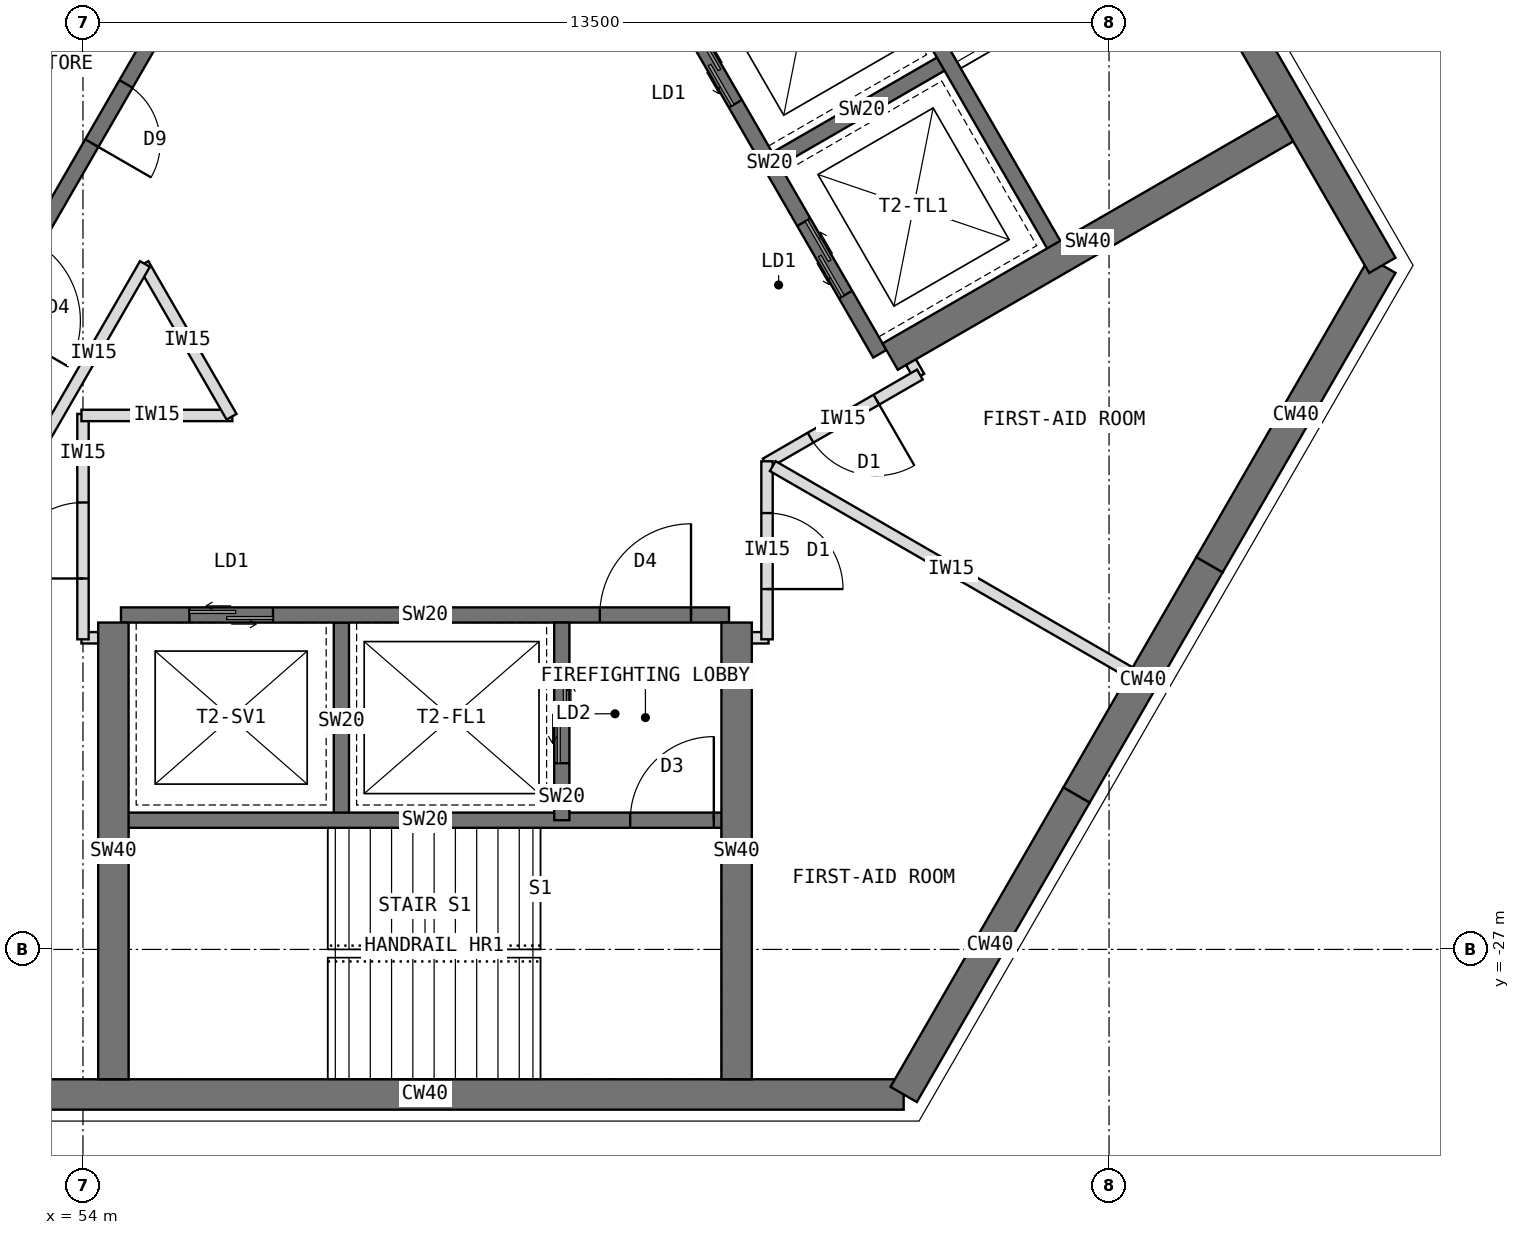
"""IFC4 building model, lengths in metres.
Left out: names, types, materials, properties, quantities, classifications, styles, units other than length and angle.
Written with IfcOpenShell. Run it as: python <this file> out.ifc"""

import sys

from ifc_helpers import new_model, si_unit, direction, frame, frame_2d, origin, place, context, subcontext, project, spatial, rectangle, extrude, element, fill, save


model = new_model("IFC4")
c1 = context("Model", 3, precision=1e-05, world=origin(), true_north=direction((0.0, 1.0)))
c2 = subcontext(c1, "Body", "Model", "MODEL_VIEW")
j1 = project(units=[si_unit("LENGTHUNIT", "METRE"), si_unit("PLANEANGLEUNIT", "RADIAN")], contexts=[c1])
p1 = place(None, origin())
s1 = spatial("IfcSite", under=j1, at=p1, CompositionType="ELEMENT")
p2 = place(p1, origin())
s2 = spatial("IfcBuilding", under=s1, at=p2, CompositionType="ELEMENT")
p3 = place(p2, frame((0.0, 0.0, 279.5)))
s3 = spatial("IfcBuildingStorey", under=s2, at=p3, CompositionType="ELEMENT", Elevation=279.5)
p4 = place(p3, frame((52.202, -28.908, 0.0), z_axis=(0.0, 0.0, 1.0), x_axis=(1.0, 0.0, 0.0)))
e1 = element("IfcWall", 1, at=p4, inside=s3, PredefinedType="SHEAR", context=c2, shape_type="SweptSolid", body=[
    extrude(rectangle(XDim=12.596, YDim=0.4, at=frame_2d((6.298, 0.0))), origin(), (0.0, 0.0, 1.0), 4.0),
])
p5 = place(p3, frame((64.798, -28.908, 0.0), z_axis=(0.0, 0.0, 1.0), x_axis=(0.499984222037, 0.866034513004, 0.0)))
e2 = element("IfcWall", 2, at=p5, inside=s3, PredefinedType="SHEAR", context=c2, shape_type="SweptSolid", body=[
    extrude(rectangle(XDim=4.548, YDim=0.4, at=frame_2d((2.274, 0.0))), origin(), (0.0, 0.0, 1.0), 4.0),
])
p6 = place(p3, frame((67.072, -24.97, 0.0), z_axis=(0.0, 0.0, 1.0), x_axis=(0.500010275428, 0.866019471182, 0.0)))
e3 = element("IfcWall", 3, at=p6, inside=s3, PredefinedType="SHEAR", context=c2, shape_type="SweptSolid", body=[
    extrude(rectangle(XDim=3.5, YDim=0.4, at=frame_2d((1.75, 0.0))), origin(), (0.0, 0.0, 1.0), 4.0),
])
p7 = place(p3, frame((68.822, -21.939, 0.0), z_axis=(0.0, 0.0, 1.0), x_axis=(0.500024481964, 0.866011268655, 0.0)))
e4 = element("IfcWall", 4, at=p7, inside=s3, PredefinedType="SHEAR", context=c2, shape_type="SweptSolid", body=[
    extrude(rectangle(XDim=4.548, YDim=0.4, at=frame_2d((2.274, 0.0))), origin(), (0.0, 0.0, 1.0), 4.0),
])
p8 = place(p3, frame((71.096, -18.0, 0.0), z_axis=(0.0, 0.0, 1.0), x_axis=(-0.500005998175, 0.866021940709, 0.0)))
e5 = element("IfcWall", 5, at=p8, inside=s3, PredefinedType="SHEAR", context=c2, shape_type="SweptSolid", body=[
    extrude(rectangle(XDim=12.596, YDim=0.4, at=frame_2d((6.298, 0.0))), origin(), (0.0, 0.0, 1.0), 4.0),
])
p9 = place(p3, frame((56.516, -12.236, 0.0), z_axis=(0.0, 0.0, 1.0), x_axis=(-0.49999894854, -0.866026010844, 0.0)))
e6 = element("IfcWall", 6, at=p9, inside=s3, PredefinedType="SHEAR", context=c2, shape_type="SweptSolid", body=[
    extrude(rectangle(XDim=8.0, YDim=0.2, at=frame_2d((4.0, 0.0))), origin(), (0.0, 0.0, 1.0), 4.0),
])
p10 = place(p9, frame((6.3, 0.0, 0.0)))
e7 = element("IfcOpeningElement", 7, at=p10, cuts=e6, PredefinedType="OPENING", context=c2, shape_type="SweptSolid", body=[
    extrude(rectangle(XDim=1.2, YDim=2.1, at=frame_2d((0.6, 1.05))), frame((0.0, 0.11, 0.0), z_axis=(0.0, -1.0, 0.0), x_axis=(1.0, 0.0, 0.0)), (0.0, 0.0, 1.0), 0.22),
])
p11 = place(p9, frame((1.0, 0.0, 0.0)))
e8 = element("IfcOpeningElement", 8, at=p11, cuts=e6, PredefinedType="OPENING", context=c2, shape_type="SweptSolid", body=[
    extrude(rectangle(XDim=0.9, YDim=2.1, at=frame_2d((0.45, 1.05))), frame((0.0, 0.11, 0.0), z_axis=(0.0, -1.0, 0.0), x_axis=(1.0, 0.0, 0.0)), (0.0, 0.0, 1.0), 0.22),
])
p12 = place(p9, frame((3.9, 0.0, 0.0)))
e9 = element("IfcOpeningElement", 9, at=p12, cuts=e6, PredefinedType="OPENING", context=c2, shape_type="SweptSolid", body=[
    extrude(rectangle(XDim=0.9, YDim=2.1, at=frame_2d((0.45, 1.05))), frame((0.0, 0.11, 0.0), z_axis=(0.0, -1.0, 0.0), x_axis=(1.0, 0.0, 0.0)), (0.0, 0.0, 1.0), 0.22),
])
p13 = place(p3, frame((54.178, -10.886, 0.0), z_axis=(0.0, 0.0, 1.0), x_axis=(-0.49999894854, -0.866026010844, 0.0)))
e10 = element("IfcWall", 10, at=p13, inside=s3, PredefinedType="SHEAR", context=c2, shape_type="SweptSolid", body=[
    extrude(rectangle(XDim=8.0, YDim=0.2, at=frame_2d((4.0, 0.0))), origin(), (0.0, 0.0, 1.0), 4.0),
])
p14 = place(p13, frame((6.8, 0.0, 0.0)))
e11 = element("IfcOpeningElement", 11, at=p14, cuts=e10, PredefinedType="OPENING", context=c2, shape_type="SweptSolid", body=[
    extrude(rectangle(XDim=0.9, YDim=2.1, at=frame_2d((0.45, 1.05))), frame((0.0, 0.11, 0.0), z_axis=(0.0, -1.0, 0.0), x_axis=(1.0, 0.0, 0.0)), (0.0, 0.0, 1.0), 0.22),
])
p15 = place(p3, frame((54.5, -22.6, 0.0), z_axis=(0.0, 0.0, 1.0), x_axis=(1.0, 0.0, 0.0)))
e12 = element("IfcWall", 12, at=p15, inside=s3, PredefinedType="SHEAR", context=c2, shape_type="SweptSolid", body=[
    extrude(rectangle(XDim=8.0, YDim=0.2, at=frame_2d((4.0, 0.0))), origin(), (0.0, 0.0, 1.0), 4.0),
])
p16 = place(p15, frame((6.3, 0.0, 0.0)))
e13 = element("IfcOpeningElement", 13, at=p16, cuts=e12, PredefinedType="OPENING", context=c2, shape_type="SweptSolid", body=[
    extrude(rectangle(XDim=1.2, YDim=2.1, at=frame_2d((0.6, 1.05))), frame((0.0, 0.11, 0.0), z_axis=(0.0, -1.0, 0.0), x_axis=(1.0, 0.0, 0.0)), (0.0, 0.0, 1.0), 0.22),
])
p17 = place(p15, frame((0.9, 0.0, 0.0)))
e14 = element("IfcOpeningElement", 14, at=p17, cuts=e12, PredefinedType="OPENING", context=c2, shape_type="SweptSolid", body=[
    extrude(rectangle(XDim=1.1, YDim=2.2, at=frame_2d((0.55, 1.1))), frame((0.0, 0.11, 0.0), z_axis=(0.0, -1.0, 0.0), x_axis=(1.0, 0.0, 0.0)), (0.0, 0.0, 1.0), 0.22),
])
p18 = place(p3, frame((57.4, -22.7, 0.0), z_axis=(0.0, 0.0, 1.0), x_axis=(0.0, -1.0, 0.0)))
e15 = element("IfcWall", 15, at=p18, inside=s3, PredefinedType="SHEAR", context=c2, shape_type="SweptSolid", body=[
    extrude(rectangle(XDim=2.6, YDim=0.2, at=frame_2d((1.3, 0.0))), origin(), (0.0, 0.0, 1.0), 4.0),
])
p19 = place(p3, frame((60.3, -22.7, 0.0), z_axis=(0.0, 0.0, 1.0), x_axis=(0.0, -1.0, 0.0)))
e16 = element("IfcWall", 16, at=p19, inside=s3, PredefinedType="SHEAR", context=c2, shape_type="SweptSolid", body=[
    extrude(rectangle(XDim=2.6, YDim=0.2, at=frame_2d((1.3, 0.0))), origin(), (0.0, 0.0, 1.0), 4.0),
])
p20 = place(p19, frame((0.55, 0.0, 0.0)))
e17 = element("IfcOpeningElement", 17, at=p20, cuts=e16, PredefinedType="OPENING", context=c2, shape_type="SweptSolid", body=[
    extrude(rectangle(XDim=1.3, YDim=2.2, at=frame_2d((0.65, 1.1))), frame((0.0, 0.11, 0.0), z_axis=(0.0, -1.0, 0.0), x_axis=(1.0, 0.0, 0.0)), (0.0, 0.0, 1.0), 0.22),
])
p21 = place(p3, frame((54.5, -25.3, 0.0), z_axis=(0.0, 0.0, 1.0), x_axis=(1.0, 0.0, 0.0)))
e18 = element("IfcWall", 18, at=p21, inside=s3, PredefinedType="SHEAR", context=c2, shape_type="SweptSolid", body=[
    extrude(rectangle(XDim=8.0, YDim=0.2, at=frame_2d((4.0, 0.0))), origin(), (0.0, 0.0, 1.0), 4.0),
])
p22 = place(p21, frame((6.7, 0.0, 0.0)))
e19 = element("IfcOpeningElement", 19, at=p22, cuts=e18, PredefinedType="OPENING", context=c2, shape_type="SweptSolid", body=[
    extrude(rectangle(XDim=1.1, YDim=2.1, at=frame_2d((0.55, 1.05))), frame((0.0, 0.11, 0.0), z_axis=(0.0, -1.0, 0.0), x_axis=(1.0, 0.0, 0.0)), (0.0, 0.0, 1.0), 0.22),
])
for number, where, z_axis, x_axis in (
    (20, (62.6, -22.7, 0.0), (0.0, 0.0, 1.0), (0.0, -1.0, 0.0)),
    (21, (54.4, -22.7, 0.0), (0.0, 0.0, 1.0), (0.0, -1.0, 0.0)),
):
    element("IfcWall", number, at=place(p3, frame(where, z_axis=z_axis, x_axis=x_axis)), inside=s3, PredefinedType="SHEAR", context=c2, shape_type="SweptSolid", body=[
        extrude(rectangle(XDim=6.008, YDim=0.4, at=frame_2d((3.004, 0.0))), origin(), (0.0, 0.0, 1.0), 4.0),
    ])
p23 = place(p3, frame((64.484, -19.164, 0.0), z_axis=(0.0, 0.0, 1.0), x_axis=(-0.49999894854, 0.866026010844, 0.0)))
e22 = element("IfcWall", 22, at=p23, inside=s3, PredefinedType="SHEAR", context=c2, shape_type="SweptSolid", body=[
    extrude(rectangle(XDim=8.0, YDim=0.2, at=frame_2d((4.0, 0.0))), origin(), (0.0, 0.0, 1.0), 4.0),
])
p24 = place(p23, frame((6.3, 0.0, 0.0)))
e23 = element("IfcOpeningElement", 23, at=p24, cuts=e22, PredefinedType="OPENING", context=c2, shape_type="SweptSolid", body=[
    extrude(rectangle(XDim=1.2, YDim=2.1, at=frame_2d((0.6, 1.05))), frame((0.0, 0.11, 0.0), z_axis=(0.0, -1.0, 0.0), x_axis=(1.0, 0.0, 0.0)), (0.0, 0.0, 1.0), 0.22),
])
p25 = place(p23, frame((0.9, 0.0, 0.0)))
e24 = element("IfcOpeningElement", 24, at=p25, cuts=e22, PredefinedType="OPENING", context=c2, shape_type="SweptSolid", body=[
    extrude(rectangle(XDim=1.1, YDim=2.2, at=frame_2d((0.55, 1.1))), frame((0.0, 0.11, 0.0), z_axis=(0.0, -1.0, 0.0), x_axis=(1.0, 0.0, 0.0)), (0.0, 0.0, 1.0), 0.22),
])
p26 = place(p23, frame((3.8, 0.0, 0.0)))
e25 = element("IfcOpeningElement", 25, at=p26, cuts=e22, PredefinedType="OPENING", context=c2, shape_type="SweptSolid", body=[
    extrude(rectangle(XDim=1.1, YDim=2.2, at=frame_2d((0.55, 1.1))), frame((0.0, 0.11, 0.0), z_axis=(0.0, -1.0, 0.0), x_axis=(1.0, 0.0, 0.0)), (0.0, 0.0, 1.0), 0.22),
])
p27 = place(p3, frame((63.12, -16.603, 0.0), z_axis=(0.0, 0.0, 1.0), x_axis=(0.866062058628, 0.499936506574, 0.0)))
e26 = element("IfcWall", 26, at=p27, inside=s3, PredefinedType="SHEAR", context=c2, shape_type="SweptSolid", body=[
    extrude(rectangle(XDim=2.6, YDim=0.2, at=frame_2d((1.3, 0.0))), origin(), (0.0, 0.0, 1.0), 4.0),
])
p28 = place(p3, frame((66.822, -17.814, 0.0), z_axis=(0.0, 0.0, 1.0), x_axis=(-0.49999894854, 0.866026010844, 0.0)))
e27 = element("IfcWall", 27, at=p28, inside=s3, PredefinedType="SHEAR", context=c2, shape_type="SweptSolid", body=[
    extrude(rectangle(XDim=8.0, YDim=0.2, at=frame_2d((4.0, 0.0))), origin(), (0.0, 0.0, 1.0), 4.0),
])
p29 = place(p28, frame((6.7, 0.0, 0.0)))
e28 = element("IfcOpeningElement", 28, at=p29, cuts=e27, PredefinedType="OPENING", context=c2, shape_type="SweptSolid", body=[
    extrude(rectangle(XDim=1.1, YDim=2.1, at=frame_2d((0.55, 1.05))), frame((0.0, 0.11, 0.0), z_axis=(0.0, -1.0, 0.0), x_axis=(1.0, 0.0, 0.0)), (0.0, 0.0, 1.0), 0.22),
])
p30 = place(p3, frame((64.62, -19.201, 0.0), z_axis=(0.0, 0.0, 1.0), x_axis=(0.866026570101, 0.499997979876, 0.0)))
e29 = element("IfcWall", 29, at=p30, inside=s3, PredefinedType="SHEAR", context=c2, shape_type="SweptSolid", body=[
    extrude(rectangle(XDim=6.008, YDim=0.4, at=frame_2d((3.004, 0.0))), origin(), (0.0, 0.0, 1.0), 4.0),
])
for number, where, z_axis, x_axis in (
    (30, (63.02, -22.9, 0.0), (0.0, 0.0, 1.0), (-1.0, 0.0, 0.0)),
    (31, (54.41, -22.9, 0.0), (0.0, 0.0, 1.0), (-1.0, 0.0, 0.0)),
):
    element("IfcWall", number, at=place(p3, frame(where, z_axis=z_axis, x_axis=x_axis)), inside=s3, PredefinedType="PARTITIONING", context=c2, shape_type="SweptSolid", body=[
        extrude(rectangle(XDim=0.43, YDim=0.15, at=frame_2d((0.215, 0.0))), origin(), (0.0, 0.0, 1.0), 3.8),
    ])
p31 = place(p3, frame((54.0, -22.92, 0.0), z_axis=(0.0, 0.0, 1.0), x_axis=(0.0, 1.0, 0.0)))
e32 = element("IfcWall", 32, at=p31, inside=s3, PredefinedType="PARTITIONING", context=c2, shape_type="SweptSolid", body=[
    extrude(rectangle(XDim=2.965, YDim=0.15, at=frame_2d((1.482, 0.0))), origin(), (0.0, 0.0, 1.0), 3.8),
])
p32 = place(p31, frame((0.8, 0.0, 0.0)))
e33 = element("IfcOpeningElement", 33, at=p32, cuts=e32, PredefinedType="OPENING", context=c2, shape_type="SweptSolid", body=[
    extrude(rectangle(XDim=1.0, YDim=2.1, at=frame_2d((0.5, 1.05))), frame((0.0, 0.085, 0.0), z_axis=(0.0, -1.0, 0.0), x_axis=(1.0, 0.0, 0.0)), (0.0, 0.0, 1.0), 0.17),
])
p33 = place(p3, frame((53.98, -19.975, 0.0), z_axis=(0.0, 0.0, 1.0), x_axis=(1.0, 0.0, 0.0)))
e34 = element("IfcWall", 34, at=p33, inside=s3, PredefinedType="PARTITIONING", context=c2, shape_type="SweptSolid", body=[
    extrude(rectangle(XDim=1.985, YDim=0.15, at=frame_2d((0.993, 0.0))), origin(), (0.0, 0.0, 1.0), 3.8),
])
p34 = place(p3, frame((55.955, -19.992, 0.0), z_axis=(0.0, 0.0, 1.0), x_axis=(-0.499941024108, 0.866059450854, 0.0)))
e35 = element("IfcWall", 35, at=p34, inside=s3, PredefinedType="PARTITIONING", context=c2, shape_type="SweptSolid", body=[
    extrude(rectangle(XDim=2.321, YDim=0.15, at=frame_2d((1.16, 0.0))), origin(), (0.0, 0.0, 1.0), 3.8),
])
p35 = place(p3, frame((54.815, -17.983, 0.0), z_axis=(0.0, 0.0, 1.0), x_axis=(-0.499981473571, -0.866036099759, 0.0)))
e36 = element("IfcWall", 36, at=p35, inside=s3, PredefinedType="PARTITIONING", context=c2, shape_type="SweptSolid", body=[
    extrude(rectangle(XDim=2.692, YDim=0.15, at=frame_2d((1.346, 0.0))), origin(), (0.0, 0.0, 1.0), 3.8),
])
p36 = place(p3, frame((64.789, -19.092, 0.0), z_axis=(0.0, 0.0, 1.0), x_axis=(0.499804398801, -0.866138304741, 0.0)))
e37 = element("IfcWall", 37, at=p36, inside=s3, PredefinedType="PARTITIONING", context=c2, shape_type="SweptSolid", body=[
    extrude(rectangle(XDim=0.43, YDim=0.15, at=frame_2d((0.215, 0.0))), origin(), (0.0, 0.0, 1.0), 3.8),
])
p37 = place(p3, frame((65.011, -19.437, 0.0), z_axis=(0.0, 0.0, 1.0), x_axis=(-0.865982457891, -0.500074377092, 0.0)))
e38 = element("IfcWall", 38, at=p37, inside=s3, PredefinedType="PARTITIONING", context=c2, shape_type="SweptSolid", body=[
    extrude(rectangle(XDim=2.342, YDim=0.15, at=frame_2d((1.171, 0.0))), origin(), (0.0, 0.0, 1.0), 3.8),
])
p38 = place(p37, frame((0.661, 0.0, 0.0)))
e39 = element("IfcOpeningElement", 39, at=p38, cuts=e38, PredefinedType="OPENING", context=c2, shape_type="SweptSolid", body=[
    extrude(rectangle(XDim=1.0, YDim=2.1, at=frame_2d((0.5, 1.05))), frame((0.0, 0.085, 0.0), z_axis=(0.0, -1.0, 0.0), x_axis=(1.0, 0.0, 0.0)), (0.0, 0.0, 1.0), 0.17),
])
p39 = place(p3, frame((63.0, -20.578, 0.0), z_axis=(0.0, 0.0, 1.0), x_axis=(0.0, -1.0, 0.0)))
e40 = element("IfcWall", 40, at=p39, inside=s3, PredefinedType="PARTITIONING", context=c2, shape_type="SweptSolid", body=[
    extrude(rectangle(XDim=2.342, YDim=0.15, at=frame_2d((1.171, 0.0))), origin(), (0.0, 0.0, 1.0), 3.8),
])
p40 = place(p39, frame((0.681, 0.0, 0.0)))
e41 = element("IfcOpeningElement", 41, at=p40, cuts=e40, PredefinedType="OPENING", context=c2, shape_type="SweptSolid", body=[
    extrude(rectangle(XDim=1.0, YDim=2.1, at=frame_2d((0.5, 1.05))), frame((0.0, 0.085, 0.0), z_axis=(0.0, -1.0, 0.0), x_axis=(1.0, 0.0, 0.0)), (0.0, 0.0, 1.0), 0.17),
])
p41 = place(p3, frame((63.075, -20.641, 0.0), z_axis=(0.0, 0.0, 1.0), x_axis=(0.866019232626, -0.500010688608, 0.0)))
e42 = element("IfcWall", 42, at=p41, inside=s3, PredefinedType="PARTITIONING", context=c2, shape_type="SweptSolid", body=[
    extrude(rectangle(XDim=5.426, YDim=0.15, at=frame_2d((2.713, 0.0))), origin(), (0.0, 0.0, 1.0), 3.8),
])
p42 = place(p16, origin())
e43 = element("IfcDoor", 43, at=p42, inside=s3, OperationType="SINGLE_SWING_RIGHT", PredefinedType="DOOR", context=c2, shape_type="SweptSolid", body=[
    extrude(rectangle(XDim=1.2, YDim=2.1, at=frame_2d((0.6, 1.05))), frame((0.0, 0.025, 0.0), z_axis=(0.0, -1.0, 0.0), x_axis=(1.0, 0.0, 0.0)), (0.0, 0.0, 1.0), 0.05),
])
fill(e13, e43)
p43 = place(p20, origin())
e44 = element("IfcDoor", 44, at=p43, inside=s3, OperationType="DOUBLE_DOOR_SLIDING", PredefinedType="DOOR", context=c2, shape_type="SweptSolid", body=[
    extrude(rectangle(XDim=1.3, YDim=2.2, at=frame_2d((0.65, 1.1))), frame((0.0, 0.025, 0.0), z_axis=(0.0, -1.0, 0.0), x_axis=(1.0, 0.0, 0.0)), (0.0, 0.0, 1.0), 0.05),
])
fill(e17, e44)
p44 = place(p17, origin())
e45 = element("IfcDoor", 45, at=p44, inside=s3, OperationType="DOUBLE_DOOR_SLIDING", PredefinedType="DOOR", context=c2, shape_type="SweptSolid", body=[
    extrude(rectangle(XDim=1.1, YDim=2.2, at=frame_2d((0.55, 1.1))), frame((0.0, 0.025, 0.0), z_axis=(0.0, -1.0, 0.0), x_axis=(1.0, 0.0, 0.0)), (0.0, 0.0, 1.0), 0.05),
])
fill(e14, e45)
p45 = place(p22, origin())
e46 = element("IfcDoor", 46, at=p45, inside=s3, OperationType="SINGLE_SWING_RIGHT", PredefinedType="DOOR", context=c2, shape_type="SweptSolid", body=[
    extrude(rectangle(XDim=1.1, YDim=2.1, at=frame_2d((0.55, 1.05))), frame((0.0, 0.025, 0.0), z_axis=(0.0, -1.0, 0.0), x_axis=(1.0, 0.0, 0.0)), (0.0, 0.0, 1.0), 0.05),
])
fill(e19, e46)
p46 = place(p25, origin())
e47 = element("IfcDoor", 47, at=p46, inside=s3, OperationType="DOUBLE_DOOR_SLIDING", PredefinedType="DOOR", context=c2, shape_type="SweptSolid", body=[
    extrude(rectangle(XDim=1.1, YDim=2.2, at=frame_2d((0.55, 1.1))), frame((0.0, 0.025, 0.0), z_axis=(0.0, -1.0, 0.0), x_axis=(1.0, 0.0, 0.0)), (0.0, 0.0, 1.0), 0.05),
])
fill(e24, e47)
p47 = place(p26, origin())
e48 = element("IfcDoor", 48, at=p47, inside=s3, OperationType="DOUBLE_DOOR_SLIDING", PredefinedType="DOOR", context=c2, shape_type="SweptSolid", body=[
    extrude(rectangle(XDim=1.1, YDim=2.2, at=frame_2d((0.55, 1.1))), frame((0.0, 0.025, 0.0), z_axis=(0.0, -1.0, 0.0), x_axis=(1.0, 0.0, 0.0)), (0.0, 0.0, 1.0), 0.05),
])
fill(e25, e48)
p48 = place(p32, origin())
e49 = element("IfcDoor", 49, at=p48, inside=s3, OperationType="SINGLE_SWING_LEFT", PredefinedType="DOOR", context=c2, shape_type="SweptSolid", body=[
    extrude(rectangle(XDim=1.0, YDim=2.1, at=frame_2d((0.5, 1.05))), frame((0.0, 0.025, 0.0), z_axis=(0.0, -1.0, 0.0), x_axis=(1.0, 0.0, 0.0)), (0.0, 0.0, 1.0), 0.05),
])
fill(e33, e49)
p49 = place(p40, origin())
e50 = element("IfcDoor", 50, at=p49, inside=s3, OperationType="SINGLE_SWING_RIGHT", PredefinedType="DOOR", context=c2, shape_type="SweptSolid", body=[
    extrude(rectangle(XDim=1.0, YDim=2.1, at=frame_2d((0.5, 1.05))), frame((0.0, 0.025, 0.0), z_axis=(0.0, -1.0, 0.0), x_axis=(1.0, 0.0, 0.0)), (0.0, 0.0, 1.0), 0.05),
])
fill(e41, e50)
p50 = place(p38, origin())
e51 = element("IfcDoor", 51, at=p50, inside=s3, OperationType="SINGLE_SWING_LEFT", PredefinedType="DOOR", context=c2, shape_type="SweptSolid", body=[
    extrude(rectangle(XDim=1.0, YDim=2.1, at=frame_2d((0.5, 1.05))), frame((0.0, 0.025, 0.0), z_axis=(0.0, -1.0, 0.0), x_axis=(1.0, 0.0, 0.0)), (0.0, 0.0, 1.0), 0.05),
])
fill(e39, e51)
p51 = place(p12, origin())
e52 = element("IfcDoor", 52, at=p51, inside=s3, OperationType="SINGLE_SWING_RIGHT", PredefinedType="DOOR", context=c2, shape_type="SweptSolid", body=[
    extrude(rectangle(XDim=0.9, YDim=2.1, at=frame_2d((0.45, 1.05))), frame((0.0, 0.025, 0.0), z_axis=(0.0, -1.0, 0.0), x_axis=(1.0, 0.0, 0.0)), (0.0, 0.0, 1.0), 0.05),
])
fill(e9, e52)
save(model, sys.argv[1])
